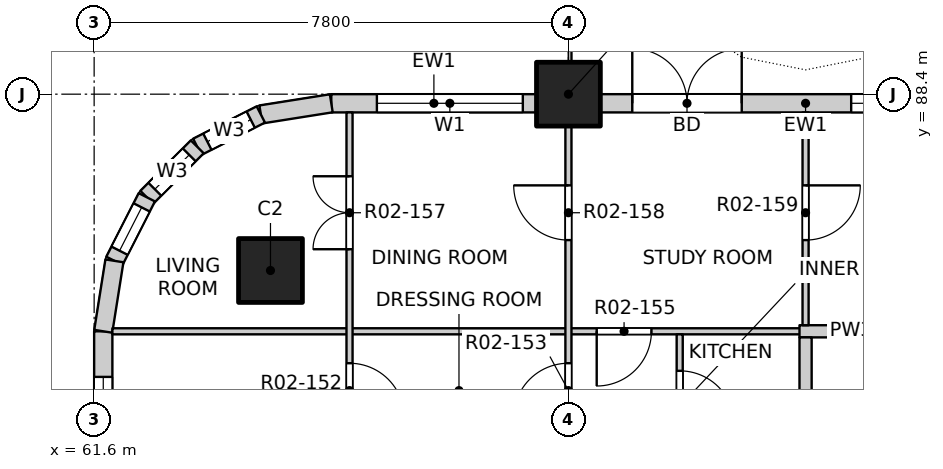
"""IFC4 building model, lengths in metres.
Left out: names, types, materials, properties, quantities, classifications, styles, units other than length and angle.
Written with IfcOpenShell. Run it as: python <this file> out.ifc"""

import sys

from ifc_helpers import new_model, si_unit, direction, frame, frame_2d, origin, origin_2d, place, context, subcontext, project, spatial, rectangle, extrude, element, fill, save


model = new_model("IFC4")
c1 = context("Model", 3, precision=1e-05, world=origin(), true_north=direction((0.0, 1.0)))
c2 = subcontext(c1, "Body", "Model", "MODEL_VIEW")
j1 = project(units=[si_unit("LENGTHUNIT", "METRE"), si_unit("PLANEANGLEUNIT", "RADIAN")], contexts=[c1])
p1 = place(None, origin())
s1 = spatial("IfcSite", under=j1, at=p1, CompositionType="ELEMENT")
p2 = place(p1, origin())
s2 = spatial("IfcBuilding", under=s1, at=p2, CompositionType="ELEMENT")
p3 = place(p2, frame((0.0, 0.0, 36.5)))
s3 = spatial("IfcBuildingStorey", under=s2, at=p3, CompositionType="ELEMENT", Elevation=36.5)
for number, where, z_axis, x_axis in (
    (1, (64.5, 85.5, -0.25), (0.0, 0.0, 1.0), (1.0, 0.0, 0.0)),
    (2, (69.4, 88.4, -0.25), (0.0, 0.0, 1.0), (1.0, 0.0, 0.0)),
):
    element("IfcColumn", number, at=place(p3, frame(where, z_axis=z_axis, x_axis=x_axis)), inside=s3, PredefinedType="COLUMN", context=c2, shape_type="SweptSolid", body=[
        extrude(rectangle(XDim=1.05, YDim=1.05, at=origin_2d()), origin(), (0.0, 0.0, 1.0), 3.4),
    ])
p4 = place(p3, frame((65.5, 88.25, 0.0), z_axis=(0.0, 0.0, 1.0), x_axis=(1.0, 0.0, 0.0)))
e3 = element("IfcWall", 3, at=p4, inside=s3, PredefinedType="SOLIDWALL", context=c2, shape_type="SweptSolid", body=[
    extrude(rectangle(XDim=3.375, YDim=0.3, at=frame_2d((1.688, 0.0))), origin(), (0.0, 0.0, 1.0), 2.7),
])
p5 = place(p4, frame((0.75, 0.0, 0.9)))
e4 = element("IfcOpeningElement", 4, at=p5, cuts=e3, PredefinedType="OPENING", context=c2, shape_type="SweptSolid", body=[
    extrude(rectangle(XDim=2.4, YDim=1.8, at=frame_2d((1.2, 0.9))), frame((0.0, 0.16, 0.0), z_axis=(0.0, -1.0, 0.0), x_axis=(1.0, 0.0, 0.0)), (0.0, 0.0, 1.0), 0.32),
])
p6 = place(p3, frame((69.925, 88.25, 0.0), z_axis=(0.0, 0.0, 1.0), x_axis=(1.0, 0.0, 0.0)))
e5 = element("IfcWall", 5, at=p6, inside=s3, PredefinedType="SOLIDWALL", context=c2, shape_type="SweptSolid", body=[
    extrude(rectangle(XDim=6.75, YDim=0.3, at=frame_2d((3.375, 0.0))), origin(), (0.0, 0.0, 1.0), 2.7),
])
p7 = place(p6, frame((0.525, 0.0, 0.0)))
e6 = element("IfcOpeningElement", 6, at=p7, cuts=e5, PredefinedType="OPENING", context=c2, shape_type="SweptSolid", body=[
    extrude(rectangle(XDim=1.8, YDim=2.4, at=frame_2d((0.9, 1.2))), frame((0.0, 0.16, 0.0), z_axis=(0.0, -1.0, 0.0), x_axis=(1.0, 0.0, 0.0)), (0.0, 0.0, 1.0), 0.32),
])
p8 = place(p6, frame((4.125, 0.0, 0.9)))
e7 = element("IfcOpeningElement", 7, at=p8, cuts=e5, PredefinedType="OPENING", context=c2, shape_type="SweptSolid", body=[
    extrude(rectangle(XDim=2.4, YDim=1.8, at=frame_2d((1.2, 0.9))), frame((0.0, 0.16, 0.0), z_axis=(0.0, -1.0, 0.0), x_axis=(1.0, 0.0, 0.0)), (0.0, 0.0, 1.0), 0.32),
])
p9 = place(p3, frame((61.75, 81.125, 0.0), z_axis=(0.0, 0.0, 1.0), x_axis=(0.0, 1.0, 0.0)))
e8 = element("IfcWall", 8, at=p9, inside=s3, PredefinedType="SOLIDWALL", context=c2, shape_type="SweptSolid", body=[
    extrude(rectangle(XDim=3.375, YDim=0.3, at=frame_2d((1.688, 0.0))), origin(), (0.0, 0.0, 1.0), 2.7),
])
p10 = place(p9, frame((0.225, 0.0, 0.9)))
e9 = element("IfcOpeningElement", 9, at=p10, cuts=e8, PredefinedType="OPENING", context=c2, shape_type="SweptSolid", body=[
    extrude(rectangle(XDim=2.4, YDim=1.8, at=frame_2d((1.2, 0.9))), frame((0.0, 0.16, 0.0), z_axis=(0.0, -1.0, 0.0), x_axis=(1.0, 0.0, 0.0)), (0.0, 0.0, 1.0), 0.32),
])
p11 = place(p3, frame((65.5, 88.25, 0.0), z_axis=(0.0, 0.0, 1.0), x_axis=(-0.987678452879, -0.156496880861, 0.0)))
e10 = element("IfcWall", 10, at=p11, inside=s3, PredefinedType="SOLIDWALL", context=c2, shape_type="SweptSolid", body=[
    extrude(rectangle(XDim=1.173, YDim=0.3, at=frame_2d((0.586, 0.0))), origin(), (0.0, 0.0, 1.0), 2.7),
])
p12 = place(p3, frame((64.341, 88.066, 0.0), z_axis=(0.0, 0.0, 1.0), x_axis=(-0.890988677504, -0.454025524128, 0.0)))
e11 = element("IfcWall", 11, at=p12, inside=s3, PredefinedType="SOLIDWALL", context=c2, shape_type="SweptSolid", body=[
    extrude(rectangle(XDim=1.173, YDim=0.3, at=frame_2d((0.587, 0.0))), origin(), (0.0, 0.0, 1.0), 2.7),
])
p13 = place(p12, frame((0.187, 0.0, 0.9)))
e12 = element("IfcOpeningElement", 12, at=p13, cuts=e11, PredefinedType="OPENING", context=c2, shape_type="SweptSolid", body=[
    extrude(rectangle(XDim=0.8, YDim=1.2, at=frame_2d((0.4, 0.6))), frame((0.0, 0.16, 0.0), z_axis=(0.0, -1.0, 0.0), x_axis=(1.0, 0.0, 0.0)), (0.0, 0.0, 1.0), 0.32),
])
p14 = place(p3, frame((63.296, 87.534, 0.0), z_axis=(0.0, 0.0, 1.0), x_axis=(-0.707106781187, -0.707106781187, 0.0)))
e13 = element("IfcWall", 13, at=p14, inside=s3, PredefinedType="SOLIDWALL", context=c2, shape_type="SweptSolid", body=[
    extrude(rectangle(XDim=1.173, YDim=0.3, at=frame_2d((0.586, 0.0))), origin(), (0.0, 0.0, 1.0), 2.7),
])
p15 = place(p14, frame((0.187, 0.0, 0.9)))
e14 = element("IfcOpeningElement", 14, at=p15, cuts=e13, PredefinedType="OPENING", context=c2, shape_type="SweptSolid", body=[
    extrude(rectangle(XDim=0.8, YDim=1.2, at=frame_2d((0.4, 0.6))), frame((0.0, 0.16, 0.0), z_axis=(0.0, -1.0, 0.0), x_axis=(1.0, 0.0, 0.0)), (0.0, 0.0, 1.0), 0.32),
])
p16 = place(p3, frame((62.466, 86.704, 0.0), z_axis=(0.0, 0.0, 1.0), x_axis=(-0.454025524128, -0.890988677504, 0.0)))
e15 = element("IfcWall", 15, at=p16, inside=s3, PredefinedType="SOLIDWALL", context=c2, shape_type="SweptSolid", body=[
    extrude(rectangle(XDim=1.173, YDim=0.3, at=frame_2d((0.587, 0.0))), origin(), (0.0, 0.0, 1.0), 2.7),
])
p17 = place(p16, frame((0.187, 0.0, 0.9)))
e16 = element("IfcOpeningElement", 16, at=p17, cuts=e15, PredefinedType="OPENING", context=c2, shape_type="SweptSolid", body=[
    extrude(rectangle(XDim=0.8, YDim=1.2, at=frame_2d((0.4, 0.6))), frame((0.0, 0.16, 0.0), z_axis=(0.0, -1.0, 0.0), x_axis=(1.0, 0.0, 0.0)), (0.0, 0.0, 1.0), 0.32),
])
p18 = place(p3, frame((61.934, 85.659, 0.0), z_axis=(0.0, 0.0, 1.0), x_axis=(-0.156496880861, -0.987678452879, 0.0)))
e17 = element("IfcWall", 17, at=p18, inside=s3, PredefinedType="SOLIDWALL", context=c2, shape_type="SweptSolid", body=[
    extrude(rectangle(XDim=1.173, YDim=0.3, at=frame_2d((0.586, 0.0))), origin(), (0.0, 0.0, 1.0), 2.7),
])
p19 = place(p3, frame((61.9, 84.5, 0.0), z_axis=(0.0, 0.0, 1.0), x_axis=(1.0, 0.0, 0.0)))
e18 = element("IfcWall", 18, at=p19, inside=s3, PredefinedType="PARTITIONING", context=c2, shape_type="SweptSolid", body=[
    extrude(rectangle(XDim=11.5, YDim=0.1, at=frame_2d((5.75, 0.0))), origin(), (0.0, 0.0, 1.0), 3.15),
])
p20 = place(p19, frame((7.965, 0.0, 0.0)))
e19 = element("IfcOpeningElement", 19, at=p20, cuts=e18, PredefinedType="OPENING", context=c2, shape_type="SweptSolid", body=[
    extrude(rectangle(XDim=0.9, YDim=2.1, at=frame_2d((0.45, 1.05))), frame((0.0, 0.06, 0.0), z_axis=(0.0, -1.0, 0.0), x_axis=(1.0, 0.0, 0.0)), (0.0, 0.0, 1.0), 0.12),
])
p21 = place(p3, frame((73.2, 84.5, 0.0), z_axis=(0.0, 0.0, 1.0), x_axis=(1.0, 0.0, 0.0)))
e20 = element("IfcWall", 20, at=p21, inside=s3, PredefinedType="PARTITIONING", context=c2, shape_type="SweptSolid", body=[
    extrude(rectangle(XDim=1.7, YDim=0.2, at=frame_2d((0.85, 0.0))), origin(), (0.0, 0.0, 1.0), 3.15),
])
p22 = place(p3, frame((65.8, 76.8, 0.0), z_axis=(0.0, 0.0, 1.0), x_axis=(0.0, 1.0, 0.0)))
e21 = element("IfcWall", 21, at=p22, inside=s3, PredefinedType="PARTITIONING", context=c2, shape_type="SweptSolid", body=[
    extrude(rectangle(XDim=11.3, YDim=0.1, at=frame_2d((5.65, 0.0))), origin(), (0.0, 0.0, 1.0), 3.15),
])
p23 = place(p22, frame((0.425, 0.0, 0.0)))
e22 = element("IfcOpeningElement", 22, at=p23, cuts=e21, PredefinedType="OPENING", context=c2, shape_type="SweptSolid", body=[
    extrude(rectangle(XDim=0.9, YDim=2.1, at=frame_2d((0.45, 1.05))), frame((0.0, 0.06, 0.0), z_axis=(0.0, -1.0, 0.0), x_axis=(1.0, 0.0, 0.0)), (0.0, 0.0, 1.0), 0.12),
])
p24 = place(p22, frame((2.375, 0.0, 0.0)))
e23 = element("IfcOpeningElement", 23, at=p24, cuts=e21, PredefinedType="OPENING", context=c2, shape_type="SweptSolid", body=[
    extrude(rectangle(XDim=0.9, YDim=2.1, at=frame_2d((0.45, 1.05))), frame((0.0, 0.06, 0.0), z_axis=(0.0, -1.0, 0.0), x_axis=(1.0, 0.0, 0.0)), (0.0, 0.0, 1.0), 0.12),
])
p25 = place(p22, frame((4.325, 0.0, 0.0)))
e24 = element("IfcOpeningElement", 24, at=p25, cuts=e21, PredefinedType="OPENING", context=c2, shape_type="SweptSolid", body=[
    extrude(rectangle(XDim=0.9, YDim=2.1, at=frame_2d((0.45, 1.05))), frame((0.0, 0.06, 0.0), z_axis=(0.0, -1.0, 0.0), x_axis=(1.0, 0.0, 0.0)), (0.0, 0.0, 1.0), 0.12),
])
p26 = place(p22, frame((6.275, 0.0, 0.0)))
e25 = element("IfcOpeningElement", 25, at=p26, cuts=e21, PredefinedType="OPENING", context=c2, shape_type="SweptSolid", body=[
    extrude(rectangle(XDim=0.9, YDim=2.1, at=frame_2d((0.45, 1.05))), frame((0.0, 0.06, 0.0), z_axis=(0.0, -1.0, 0.0), x_axis=(1.0, 0.0, 0.0)), (0.0, 0.0, 1.0), 0.12),
])
p27 = place(p22, frame((9.05, 0.0, 0.0)))
e26 = element("IfcOpeningElement", 26, at=p27, cuts=e21, PredefinedType="OPENING", context=c2, shape_type="SweptSolid", body=[
    extrude(rectangle(XDim=1.2, YDim=2.1, at=frame_2d((0.6, 1.05))), frame((0.0, 0.06, 0.0), z_axis=(0.0, -1.0, 0.0), x_axis=(1.0, 0.0, 0.0)), (0.0, 0.0, 1.0), 0.12),
])
p28 = place(p3, frame((69.4, 41.9, 0.0), z_axis=(0.0, 0.0, 1.0), x_axis=(0.0, 1.0, 0.0)))
e27 = element("IfcWall", 27, at=p28, inside=s3, PredefinedType="PARTITIONING", context=c2, shape_type="SweptSolid", body=[
    extrude(rectangle(XDim=46.2, YDim=0.1, at=frame_2d((23.1, 0.0))), origin(), (0.0, 0.0, 1.0), 3.15),
])
p29 = place(p28, frame((1.2, 0.0, 0.0)))
e28 = element("IfcOpeningElement", 28, at=p29, cuts=e27, PredefinedType="OPENING", context=c2, shape_type="SweptSolid", body=[
    extrude(rectangle(XDim=0.9, YDim=2.1, at=frame_2d((0.45, 1.05))), frame((0.0, 0.06, 0.0), z_axis=(0.0, -1.0, 0.0), x_axis=(1.0, 0.0, 0.0)), (0.0, 0.0, 1.0), 0.12),
])
p30 = place(p28, frame((5.1, 0.0, 0.0)))
e29 = element("IfcOpeningElement", 29, at=p30, cuts=e27, PredefinedType="OPENING", context=c2, shape_type="SweptSolid", body=[
    extrude(rectangle(XDim=0.9, YDim=2.1, at=frame_2d((0.45, 1.05))), frame((0.0, 0.06, 0.0), z_axis=(0.0, -1.0, 0.0), x_axis=(1.0, 0.0, 0.0)), (0.0, 0.0, 1.0), 0.12),
])
p31 = place(p28, frame((9.975, 0.0, 0.0)))
e30 = element("IfcOpeningElement", 30, at=p31, cuts=e27, PredefinedType="OPENING", context=c2, shape_type="SweptSolid", body=[
    extrude(rectangle(XDim=0.9, YDim=2.1, at=frame_2d((0.45, 1.05))), frame((0.0, 0.06, 0.0), z_axis=(0.0, -1.0, 0.0), x_axis=(1.0, 0.0, 0.0)), (0.0, 0.0, 1.0), 0.12),
])
p32 = place(p28, frame((12.9, 0.0, 0.0)))
e31 = element("IfcOpeningElement", 31, at=p32, cuts=e27, PredefinedType="OPENING", context=c2, shape_type="SweptSolid", body=[
    extrude(rectangle(XDim=0.9, YDim=2.1, at=frame_2d((0.45, 1.05))), frame((0.0, 0.06, 0.0), z_axis=(0.0, -1.0, 0.0), x_axis=(1.0, 0.0, 0.0)), (0.0, 0.0, 1.0), 0.12),
])
p33 = place(p28, frame((17.775, 0.0, 0.0)))
e32 = element("IfcOpeningElement", 32, at=p33, cuts=e27, PredefinedType="OPENING", context=c2, shape_type="SweptSolid", body=[
    extrude(rectangle(XDim=0.9, YDim=2.1, at=frame_2d((0.45, 1.05))), frame((0.0, 0.06, 0.0), z_axis=(0.0, -1.0, 0.0), x_axis=(1.0, 0.0, 0.0)), (0.0, 0.0, 1.0), 0.12),
])
p34 = place(p28, frame((21.5, 0.0, 0.0)))
e33 = element("IfcOpeningElement", 33, at=p34, cuts=e27, PredefinedType="OPENING", context=c2, shape_type="SweptSolid", body=[
    extrude(rectangle(XDim=0.9, YDim=2.1, at=frame_2d((0.45, 1.05))), frame((0.0, 0.06, 0.0), z_axis=(0.0, -1.0, 0.0), x_axis=(1.0, 0.0, 0.0)), (0.0, 0.0, 1.0), 0.12),
])
p35 = place(p28, frame((24.6, 0.0, 0.0)))
e34 = element("IfcOpeningElement", 34, at=p35, cuts=e27, PredefinedType="OPENING", context=c2, shape_type="SweptSolid", body=[
    extrude(rectangle(XDim=0.9, YDim=2.1, at=frame_2d((0.45, 1.05))), frame((0.0, 0.06, 0.0), z_axis=(0.0, -1.0, 0.0), x_axis=(1.0, 0.0, 0.0)), (0.0, 0.0, 1.0), 0.12),
])
p36 = place(p28, frame((29.3, 0.0, 0.0)))
e35 = element("IfcOpeningElement", 35, at=p36, cuts=e27, PredefinedType="OPENING", context=c2, shape_type="SweptSolid", body=[
    extrude(rectangle(XDim=0.9, YDim=2.1, at=frame_2d((0.45, 1.05))), frame((0.0, 0.06, 0.0), z_axis=(0.0, -1.0, 0.0), x_axis=(1.0, 0.0, 0.0)), (0.0, 0.0, 1.0), 0.12),
])
p37 = place(p28, frame((33.375, 0.0, 0.0)))
e36 = element("IfcOpeningElement", 36, at=p37, cuts=e27, PredefinedType="OPENING", context=c2, shape_type="SweptSolid", body=[
    extrude(rectangle(XDim=0.9, YDim=2.1, at=frame_2d((0.45, 1.05))), frame((0.0, 0.06, 0.0), z_axis=(0.0, -1.0, 0.0), x_axis=(1.0, 0.0, 0.0)), (0.0, 0.0, 1.0), 0.12),
])
p38 = place(p28, frame((37.1, 0.0, 0.0)))
e37 = element("IfcOpeningElement", 37, at=p38, cuts=e27, PredefinedType="OPENING", context=c2, shape_type="SweptSolid", body=[
    extrude(rectangle(XDim=0.9, YDim=2.1, at=frame_2d((0.45, 1.05))), frame((0.0, 0.06, 0.0), z_axis=(0.0, -1.0, 0.0), x_axis=(1.0, 0.0, 0.0)), (0.0, 0.0, 1.0), 0.12),
])
p39 = place(p28, frame((41.175, 0.0, 0.0)))
e38 = element("IfcOpeningElement", 38, at=p39, cuts=e27, PredefinedType="OPENING", context=c2, shape_type="SweptSolid", body=[
    extrude(rectangle(XDim=0.9, YDim=2.1, at=frame_2d((0.45, 1.05))), frame((0.0, 0.06, 0.0), z_axis=(0.0, -1.0, 0.0), x_axis=(1.0, 0.0, 0.0)), (0.0, 0.0, 1.0), 0.12),
])
p40 = place(p28, frame((44.1, 0.0, 0.0)))
e39 = element("IfcOpeningElement", 39, at=p40, cuts=e27, PredefinedType="OPENING", context=c2, shape_type="SweptSolid", body=[
    extrude(rectangle(XDim=0.9, YDim=2.1, at=frame_2d((0.45, 1.05))), frame((0.0, 0.06, 0.0), z_axis=(0.0, -1.0, 0.0), x_axis=(1.0, 0.0, 0.0)), (0.0, 0.0, 1.0), 0.12),
])
p41 = place(p3, frame((71.23, 79.3, 0.0), z_axis=(0.0, 0.0, 1.0), x_axis=(0.0, 1.0, 0.0)))
e40 = element("IfcWall", 40, at=p41, inside=s3, PredefinedType="PARTITIONING", context=c2, shape_type="SweptSolid", body=[
    extrude(rectangle(XDim=5.15, YDim=0.1, at=frame_2d((2.575, 0.0))), origin(), (0.0, 0.0, 1.0), 3.15),
])
p42 = place(p41, frame((0.325, 0.0, 0.0)))
e41 = element("IfcOpeningElement", 41, at=p42, cuts=e40, PredefinedType="OPENING", context=c2, shape_type="SweptSolid", body=[
    extrude(rectangle(XDim=0.8, YDim=2.1, at=frame_2d((0.4, 1.05))), frame((0.0, 0.06, 0.0), z_axis=(0.0, -1.0, 0.0), x_axis=(1.0, 0.0, 0.0)), (0.0, 0.0, 1.0), 0.12),
])
p43 = place(p41, frame((1.8, 0.0, 0.0)))
e42 = element("IfcOpeningElement", 42, at=p43, cuts=e40, PredefinedType="OPENING", context=c2, shape_type="SweptSolid", body=[
    extrude(rectangle(XDim=0.9, YDim=2.1, at=frame_2d((0.45, 1.05))), frame((0.0, 0.06, 0.0), z_axis=(0.0, -1.0, 0.0), x_axis=(1.0, 0.0, 0.0)), (0.0, 0.0, 1.0), 0.12),
])
p44 = place(p41, frame((3.65, 0.0, 0.0)))
e43 = element("IfcOpeningElement", 43, at=p44, cuts=e40, PredefinedType="OPENING", context=c2, shape_type="SweptSolid", body=[
    extrude(rectangle(XDim=0.9, YDim=2.1, at=frame_2d((0.45, 1.05))), frame((0.0, 0.06, 0.0), z_axis=(0.0, -1.0, 0.0), x_axis=(1.0, 0.0, 0.0)), (0.0, 0.0, 1.0), 0.12),
])
p45 = place(p3, frame((73.3, 53.4, 0.0), z_axis=(0.0, 0.0, 1.0), x_axis=(0.0, 1.0, 0.0)))
e44 = element("IfcWall", 44, at=p45, inside=s3, PredefinedType="PARTITIONING", context=c2, shape_type="SweptSolid", body=[
    extrude(rectangle(XDim=31.0, YDim=0.2, at=frame_2d((15.5, 0.0))), origin(), (0.0, 0.0, 1.0), 3.15),
])
p46 = place(p45, frame((2.675, 0.0, 0.0)))
e45 = element("IfcOpeningElement", 45, at=p46, cuts=e44, PredefinedType="OPENING", context=c2, shape_type="SweptSolid", body=[
    extrude(rectangle(XDim=1.0, YDim=2.1, at=frame_2d((0.5, 1.05))), frame((0.0, 0.11, 0.0), z_axis=(0.0, -1.0, 0.0), x_axis=(1.0, 0.0, 0.0)), (0.0, 0.0, 1.0), 0.22),
])
p47 = place(p45, frame((18.125, 0.0, 0.0)))
e46 = element("IfcOpeningElement", 46, at=p47, cuts=e44, PredefinedType="OPENING", context=c2, shape_type="SweptSolid", body=[
    extrude(rectangle(XDim=1.0, YDim=2.1, at=frame_2d((0.5, 1.05))), frame((0.0, 0.11, 0.0), z_axis=(0.0, -1.0, 0.0), x_axis=(1.0, 0.0, 0.0)), (0.0, 0.0, 1.0), 0.22),
])
p48 = place(p45, frame((26.025, 0.0, 0.0)))
e47 = element("IfcOpeningElement", 47, at=p48, cuts=e44, PredefinedType="OPENING", context=c2, shape_type="SweptSolid", body=[
    extrude(rectangle(XDim=1.0, YDim=2.1, at=frame_2d((0.5, 1.05))), frame((0.0, 0.11, 0.0), z_axis=(0.0, -1.0, 0.0), x_axis=(1.0, 0.0, 0.0)), (0.0, 0.0, 1.0), 0.22),
])
p49 = place(p3, frame((73.3, 84.6, 0.0), z_axis=(0.0, 0.0, 1.0), x_axis=(0.0, 1.0, 0.0)))
e48 = element("IfcWall", 48, at=p49, inside=s3, PredefinedType="PARTITIONING", context=c2, shape_type="SweptSolid", body=[
    extrude(rectangle(XDim=3.5, YDim=0.1, at=frame_2d((1.75, 0.0))), origin(), (0.0, 0.0, 1.0), 3.15),
])
p50 = place(p49, frame((1.4, 0.0, 0.0)))
e49 = element("IfcOpeningElement", 49, at=p50, cuts=e48, PredefinedType="OPENING", context=c2, shape_type="SweptSolid", body=[
    extrude(rectangle(XDim=0.9, YDim=2.1, at=frame_2d((0.45, 1.05))), frame((0.0, 0.06, 0.0), z_axis=(0.0, -1.0, 0.0), x_axis=(1.0, 0.0, 0.0)), (0.0, 0.0, 1.0), 0.12),
])
p51 = place(p5, origin())
e50 = element("IfcWindow", 50, at=p51, inside=s3, PartitioningType="DOUBLE_PANEL_VERTICAL", PredefinedType="WINDOW", context=c2, shape_type="SweptSolid", body=[
    extrude(rectangle(XDim=2.4, YDim=1.8, at=frame_2d((1.2, 0.9))), frame((0.0, 0.03, 0.0), z_axis=(0.0, -1.0, 0.0), x_axis=(1.0, 0.0, 0.0)), (0.0, 0.0, 1.0), 0.06),
])
fill(e4, e50)
p52 = place(p7, origin())
e51 = element("IfcDoor", 51, at=p52, inside=s3, OperationType="DOUBLE_DOOR_SINGLE_SWING", PredefinedType="DOOR", context=c2, shape_type="SweptSolid", body=[
    extrude(rectangle(XDim=1.8, YDim=2.4, at=frame_2d((0.9, 1.2))), frame((0.0, 0.025, 0.0), z_axis=(0.0, -1.0, 0.0), x_axis=(1.0, 0.0, 0.0)), (0.0, 0.0, 1.0), 0.05),
])
fill(e6, e51)
p53 = place(p8, origin())
e52 = element("IfcWindow", 52, at=p53, inside=s3, PartitioningType="DOUBLE_PANEL_VERTICAL", PredefinedType="WINDOW", context=c2, shape_type="SweptSolid", body=[
    extrude(rectangle(XDim=2.4, YDim=1.8, at=frame_2d((1.2, 0.9))), frame((0.0, 0.03, 0.0), z_axis=(0.0, -1.0, 0.0), x_axis=(1.0, 0.0, 0.0)), (0.0, 0.0, 1.0), 0.06),
])
fill(e7, e52)
p54 = place(p10, origin())
e53 = element("IfcWindow", 53, at=p54, inside=s3, PartitioningType="DOUBLE_PANEL_VERTICAL", PredefinedType="WINDOW", context=c2, shape_type="SweptSolid", body=[
    extrude(rectangle(XDim=2.4, YDim=1.8, at=frame_2d((1.2, 0.9))), frame((0.0, 0.03, 0.0), z_axis=(0.0, -1.0, 0.0), x_axis=(1.0, 0.0, 0.0)), (0.0, 0.0, 1.0), 0.06),
])
fill(e9, e53)
p55 = place(p13, origin())
e54 = element("IfcWindow", 54, at=p55, inside=s3, PartitioningType="SINGLE_PANEL", PredefinedType="WINDOW", context=c2, shape_type="SweptSolid", body=[
    extrude(rectangle(XDim=0.8, YDim=1.2, at=frame_2d((0.4, 0.6))), frame((0.0, 0.03, 0.0), z_axis=(0.0, -1.0, 0.0), x_axis=(1.0, 0.0, 0.0)), (0.0, 0.0, 1.0), 0.06),
])
fill(e12, e54)
p56 = place(p15, origin())
e55 = element("IfcWindow", 55, at=p56, inside=s3, PartitioningType="SINGLE_PANEL", PredefinedType="WINDOW", context=c2, shape_type="SweptSolid", body=[
    extrude(rectangle(XDim=0.8, YDim=1.2, at=frame_2d((0.4, 0.6))), frame((0.0, 0.03, 0.0), z_axis=(0.0, -1.0, 0.0), x_axis=(1.0, 0.0, 0.0)), (0.0, 0.0, 1.0), 0.06),
])
fill(e14, e55)
p57 = place(p17, origin())
e56 = element("IfcWindow", 56, at=p57, inside=s3, PartitioningType="SINGLE_PANEL", PredefinedType="WINDOW", context=c2, shape_type="SweptSolid", body=[
    extrude(rectangle(XDim=0.8, YDim=1.2, at=frame_2d((0.4, 0.6))), frame((0.0, 0.03, 0.0), z_axis=(0.0, -1.0, 0.0), x_axis=(1.0, 0.0, 0.0)), (0.0, 0.0, 1.0), 0.06),
])
fill(e16, e56)
p58 = place(p44, origin())
e57 = element("IfcDoor", 57, at=p58, inside=s3, OperationType="SINGLE_SWING_RIGHT", PredefinedType="DOOR", context=c2, shape_type="SweptSolid", body=[
    extrude(rectangle(XDim=0.9, YDim=2.1, at=frame_2d((0.45, 1.05))), frame((0.0, 0.025, 0.0), z_axis=(0.0, -1.0, 0.0), x_axis=(1.0, 0.0, 0.0)), (0.0, 0.0, 1.0), 0.05),
])
fill(e43, e57)
p59 = place(p26, origin())
e58 = element("IfcDoor", 58, at=p59, inside=s3, OperationType="SINGLE_SWING_RIGHT", PredefinedType="DOOR", context=c2, shape_type="SweptSolid", body=[
    extrude(rectangle(XDim=0.9, YDim=2.1, at=frame_2d((0.45, 1.05))), frame((0.0, 0.025, 0.0), z_axis=(0.0, -1.0, 0.0), x_axis=(1.0, 0.0, 0.0)), (0.0, 0.0, 1.0), 0.05),
])
fill(e25, e58)
p60 = place(p39, origin())
e59 = element("IfcDoor", 59, at=p60, inside=s3, OperationType="SINGLE_SWING_LEFT", PredefinedType="DOOR", context=c2, shape_type="SweptSolid", body=[
    extrude(rectangle(XDim=0.9, YDim=2.1, at=frame_2d((0.45, 1.05))), frame((0.0, 0.025, 0.0), z_axis=(0.0, -1.0, 0.0), x_axis=(1.0, 0.0, 0.0)), (0.0, 0.0, 1.0), 0.05),
])
fill(e38, e59)
p61 = place(p20, origin())
e60 = element("IfcDoor", 60, at=p61, inside=s3, OperationType="SINGLE_SWING_RIGHT", PredefinedType="DOOR", context=c2, shape_type="SweptSolid", body=[
    extrude(rectangle(XDim=0.9, YDim=2.1, at=frame_2d((0.45, 1.05))), frame((0.0, 0.025, 0.0), z_axis=(0.0, -1.0, 0.0), x_axis=(1.0, 0.0, 0.0)), (0.0, 0.0, 1.0), 0.05),
])
fill(e19, e60)
p62 = place(p27, origin())
e61 = element("IfcDoor", 61, at=p62, inside=s3, OperationType="DOUBLE_DOOR_SINGLE_SWING", PredefinedType="DOOR", context=c2, shape_type="SweptSolid", body=[
    extrude(rectangle(XDim=1.2, YDim=2.1, at=frame_2d((0.6, 1.05))), frame((0.0, 0.025, 0.0), z_axis=(0.0, -1.0, 0.0), x_axis=(1.0, 0.0, 0.0)), (0.0, 0.0, 1.0), 0.05),
])
fill(e26, e61)
p63 = place(p40, origin())
e62 = element("IfcDoor", 62, at=p63, inside=s3, OperationType="SINGLE_SWING_RIGHT", PredefinedType="DOOR", context=c2, shape_type="SweptSolid", body=[
    extrude(rectangle(XDim=0.9, YDim=2.1, at=frame_2d((0.45, 1.05))), frame((0.0, 0.025, 0.0), z_axis=(0.0, -1.0, 0.0), x_axis=(1.0, 0.0, 0.0)), (0.0, 0.0, 1.0), 0.05),
])
fill(e39, e62)
p64 = place(p50, origin())
e63 = element("IfcDoor", 63, at=p64, inside=s3, OperationType="SINGLE_SWING_LEFT", PredefinedType="DOOR", context=c2, shape_type="SweptSolid", body=[
    extrude(rectangle(XDim=0.9, YDim=2.1, at=frame_2d((0.45, 1.05))), frame((0.0, 0.025, 0.0), z_axis=(0.0, -1.0, 0.0), x_axis=(1.0, 0.0, 0.0)), (0.0, 0.0, 1.0), 0.05),
])
fill(e49, e63)
save(model, sys.argv[1])
